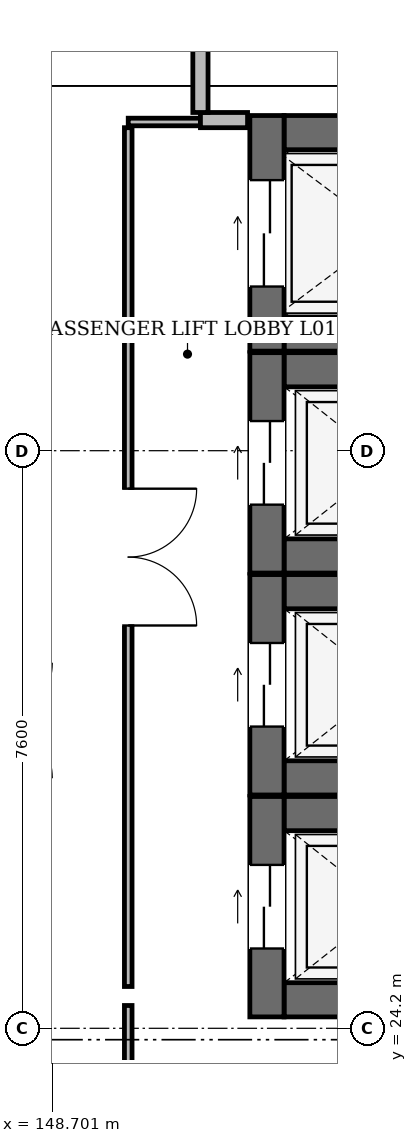
"""IFC4 building model, lengths in metres.
Left out: names, types, materials, properties, quantities, classifications, styles, units other than length and angle.
Written with IfcOpenShell. Run it as: python <this file> out.ifc"""

import sys

from ifc_helpers import new_model, si_unit, direction, frame, frame_2d, origin, place, context, subcontext, project, spatial, rectangle, extrude, element, fill, save


model = new_model("IFC4")
c1 = context("Model", 3, precision=1e-05, world=origin(), true_north=direction((0.0, 1.0)))
c2 = subcontext(c1, "Body", "Model", "MODEL_VIEW")
j1 = project(units=[si_unit("LENGTHUNIT", "METRE"), si_unit("PLANEANGLEUNIT", "RADIAN")], contexts=[c1])
p1 = place(None, origin())
s1 = spatial("IfcSite", under=j1, at=p1, CompositionType="ELEMENT")
p2 = place(p1, origin())
s2 = spatial("IfcBuilding", under=s1, at=p2, CompositionType="ELEMENT")
p3 = place(p2, frame((0.0, 0.0, 5.4)))
s3 = spatial("IfcBuildingStorey", under=s2, at=p3, CompositionType="ELEMENT", Elevation=5.4)
for number, where, z_axis, x_axis in (
    (1, (151.75, 24.575, 0.0), (0.0, 0.0, 1.0), (1.0, 0.0, 0.0)),
    (2, (151.75, 27.025, 0.0), (0.0, 0.0, 1.0), (1.0, 0.0, 0.0)),
):
    element("IfcWall", number, at=place(p3, frame(where, z_axis=z_axis, x_axis=x_axis)), inside=s3, PredefinedType="SHEAR", context=c2, shape_type="SweptSolid", body=[
        extrude(rectangle(XDim=2.7, YDim=0.45, at=frame_2d((1.35, 0.0))), origin(), (0.0, 0.0, 1.0), 4.52),
    ])
p4 = place(p3, frame((151.525, 24.35, 0.0), z_axis=(0.0, 0.0, 1.0), x_axis=(0.0, 1.0, 0.0)))
e3 = element("IfcWall", 3, at=p4, inside=s3, PredefinedType="SHEAR", context=c2, shape_type="SweptSolid", body=[
    extrude(rectangle(XDim=2.9, YDim=0.45, at=frame_2d((1.45, 0.0))), origin(), (0.0, 0.0, 1.0), 4.52),
])
p5 = place(p4, frame((0.9, 0.0, 0.0)))
e4 = element("IfcOpeningElement", 4, at=p5, cuts=e3, PredefinedType="OPENING", context=c2, shape_type="SweptSolid", body=[
    extrude(rectangle(XDim=1.1, YDim=2.2, at=frame_2d((0.55, 1.1))), frame((0.0, 0.237, 0.0), z_axis=(0.0, -1.0, 0.0), x_axis=(1.0, 0.0, 0.0)), (0.0, 0.0, 1.0), 0.474),
])
for number, where, z_axis, x_axis in (
    (5, (151.75, 27.495, 0.0), (0.0, 0.0, 1.0), (1.0, 0.0, 0.0)),
    (6, (151.75, 29.945, 0.0), (0.0, 0.0, 1.0), (1.0, 0.0, 0.0)),
):
    element("IfcWall", number, at=place(p3, frame(where, z_axis=z_axis, x_axis=x_axis)), inside=s3, PredefinedType="SHEAR", context=c2, shape_type="SweptSolid", body=[
        extrude(rectangle(XDim=2.7, YDim=0.45, at=frame_2d((1.35, 0.0))), origin(), (0.0, 0.0, 1.0), 4.52),
    ])
p6 = place(p3, frame((151.525, 27.27, 0.0), z_axis=(0.0, 0.0, 1.0), x_axis=(0.0, 1.0, 0.0)))
e7 = element("IfcWall", 7, at=p6, inside=s3, PredefinedType="SHEAR", context=c2, shape_type="SweptSolid", body=[
    extrude(rectangle(XDim=2.9, YDim=0.45, at=frame_2d((1.45, 0.0))), origin(), (0.0, 0.0, 1.0), 4.52),
])
p7 = place(p6, frame((0.9, 0.0, 0.0)))
e8 = element("IfcOpeningElement", 8, at=p7, cuts=e7, PredefinedType="OPENING", context=c2, shape_type="SweptSolid", body=[
    extrude(rectangle(XDim=1.1, YDim=2.2, at=frame_2d((0.55, 1.1))), frame((0.0, 0.237, 0.0), z_axis=(0.0, -1.0, 0.0), x_axis=(1.0, 0.0, 0.0)), (0.0, 0.0, 1.0), 0.474),
])
for number, where, z_axis, x_axis in (
    (9, (151.75, 30.415, 0.0), (0.0, 0.0, 1.0), (1.0, 0.0, 0.0)),
    (10, (151.75, 32.865, 0.0), (0.0, 0.0, 1.0), (1.0, 0.0, 0.0)),
):
    element("IfcWall", number, at=place(p3, frame(where, z_axis=z_axis, x_axis=x_axis)), inside=s3, PredefinedType="SHEAR", context=c2, shape_type="SweptSolid", body=[
        extrude(rectangle(XDim=2.7, YDim=0.45, at=frame_2d((1.35, 0.0))), origin(), (0.0, 0.0, 1.0), 4.52),
    ])
p8 = place(p3, frame((151.525, 30.19, 0.0), z_axis=(0.0, 0.0, 1.0), x_axis=(0.0, 1.0, 0.0)))
e11 = element("IfcWall", 11, at=p8, inside=s3, PredefinedType="SHEAR", context=c2, shape_type="SweptSolid", body=[
    extrude(rectangle(XDim=2.9, YDim=0.45, at=frame_2d((1.45, 0.0))), origin(), (0.0, 0.0, 1.0), 4.52),
])
p9 = place(p8, frame((0.9, 0.0, 0.0)))
e12 = element("IfcOpeningElement", 12, at=p9, cuts=e11, PredefinedType="OPENING", context=c2, shape_type="SweptSolid", body=[
    extrude(rectangle(XDim=1.1, YDim=2.2, at=frame_2d((0.55, 1.1))), frame((0.0, 0.237, 0.0), z_axis=(0.0, -1.0, 0.0), x_axis=(1.0, 0.0, 0.0)), (0.0, 0.0, 1.0), 0.474),
])
for number, where, z_axis, x_axis in (
    (13, (151.75, 33.335, 0.0), (0.0, 0.0, 1.0), (1.0, 0.0, 0.0)),
    (14, (151.75, 35.985, 0.0), (0.0, 0.0, 1.0), (1.0, 0.0, 0.0)),
):
    element("IfcWall", number, at=place(p3, frame(where, z_axis=z_axis, x_axis=x_axis)), inside=s3, PredefinedType="SHEAR", context=c2, shape_type="SweptSolid", body=[
        extrude(rectangle(XDim=2.7, YDim=0.45, at=frame_2d((1.35, 0.0))), origin(), (0.0, 0.0, 1.0), 4.52),
    ])
p10 = place(p3, frame((151.525, 33.11, 0.0), z_axis=(0.0, 0.0, 1.0), x_axis=(0.0, 1.0, 0.0)))
e15 = element("IfcWall", 15, at=p10, inside=s3, PredefinedType="SHEAR", context=c2, shape_type="SweptSolid", body=[
    extrude(rectangle(XDim=3.1, YDim=0.45, at=frame_2d((1.55, 0.0))), origin(), (0.0, 0.0, 1.0), 4.52),
])
p11 = place(p10, frame((0.85, 0.0, 0.0)))
e16 = element("IfcOpeningElement", 16, at=p11, cuts=e15, PredefinedType="OPENING", context=c2, shape_type="SweptSolid", body=[
    extrude(rectangle(XDim=1.4, YDim=2.3, at=frame_2d((0.7, 1.15))), frame((0.0, 0.237, 0.0), z_axis=(0.0, -1.0, 0.0), x_axis=(1.0, 0.0, 0.0)), (0.0, 0.0, 1.0), 0.474),
])
p12 = place(p3, frame((149.7, 24.75, 0.0), z_axis=(0.0, 0.0, 1.0), x_axis=(0.0, 1.0, 0.0)))
e17 = element("IfcWall", 17, at=p12, inside=s3, PredefinedType="PARTITIONING", context=c2, shape_type="SweptSolid", body=[
    extrude(rectangle(XDim=11.3, YDim=0.1, at=frame_2d((5.65, 0.0))), origin(), (0.0, 0.0, 1.0), 4.405),
])
p13 = place(p12, frame((4.75, 0.0, 0.0)))
e18 = element("IfcOpeningElement", 18, at=p13, cuts=e17, PredefinedType="OPENING", context=c2, shape_type="SweptSolid", body=[
    extrude(rectangle(XDim=1.8, YDim=2.4, at=frame_2d((0.9, 1.2))), frame((0.0, 0.062, 0.0), z_axis=(0.0, -1.0, 0.0), x_axis=(1.0, 0.0, 0.0)), (0.0, 0.0, 1.0), 0.124),
])
p14 = place(p3, frame((149.7, 36.125, 0.0), z_axis=(0.0, 0.0, 1.0), x_axis=(1.0, 0.0, 0.0)))
e19 = element("IfcWall", 19, at=p14, inside=s3, PredefinedType="PARTITIONING", context=c2, shape_type="SweptSolid", body=[
    extrude(rectangle(XDim=0.95, YDim=0.1, at=frame_2d((0.475, 0.0))), origin(), (0.0, 0.0, 1.0), 4.405),
])
p15 = place(p3, frame((150.65, 36.15, 0.0), z_axis=(0.0, 0.0, 1.0), x_axis=(1.0, 0.0, 0.0)))
e20 = element("IfcWall", 20, at=p15, inside=s3, PredefinedType="PARTITIONING", context=c2, shape_type="SweptSolid", body=[
    extrude(rectangle(XDim=0.62, YDim=0.2, at=frame_2d((0.31, 0.0))), origin(), (0.0, 0.0, 1.0), 4.405),
])
p16 = place(p3, frame((149.7, 24.5, 0.0), z_axis=(0.0, 0.0, 1.0), x_axis=(0.0, -1.0, 0.0)))
e21 = element("IfcWall", 21, at=p16, inside=s3, PredefinedType="PARTITIONING", context=c2, shape_type="SweptSolid", body=[
    extrude(rectangle(XDim=0.8, YDim=0.1, at=frame_2d((0.4, 0.0))), origin(), (0.0, 0.0, 1.0), 4.405),
])
p17 = place(p3, frame((150.65, 47.6, 0.0), z_axis=(0.0, 0.0, 1.0), x_axis=(0.0, -1.0, 0.0)))
e22 = element("IfcWall", 22, at=p17, inside=s3, PredefinedType="PARTITIONING", context=c2, shape_type="SweptSolid", body=[
    extrude(rectangle(XDim=11.35, YDim=0.2, at=frame_2d((5.675, 0.0))), origin(), (0.0, 0.0, 1.0), 4.405),
])
p18 = place(p5, origin())
e23 = element("IfcDoor", 23, at=p18, inside=s3, OperationType="DOUBLE_DOOR_SLIDING", PredefinedType="DOOR", context=c2, shape_type="SweptSolid", body=[
    extrude(rectangle(XDim=1.1, YDim=2.2, at=frame_2d((0.55, 1.1))), frame((0.0, 0.025, 0.0), z_axis=(0.0, -1.0, 0.0), x_axis=(1.0, 0.0, 0.0)), (0.0, 0.0, 1.0), 0.05),
])
fill(e4, e23)
p19 = place(p7, origin())
e24 = element("IfcDoor", 24, at=p19, inside=s3, OperationType="DOUBLE_DOOR_SLIDING", PredefinedType="DOOR", context=c2, shape_type="SweptSolid", body=[
    extrude(rectangle(XDim=1.1, YDim=2.2, at=frame_2d((0.55, 1.1))), frame((0.0, 0.025, 0.0), z_axis=(0.0, -1.0, 0.0), x_axis=(1.0, 0.0, 0.0)), (0.0, 0.0, 1.0), 0.05),
])
fill(e8, e24)
p20 = place(p9, origin())
e25 = element("IfcDoor", 25, at=p20, inside=s3, OperationType="DOUBLE_DOOR_SLIDING", PredefinedType="DOOR", context=c2, shape_type="SweptSolid", body=[
    extrude(rectangle(XDim=1.1, YDim=2.2, at=frame_2d((0.55, 1.1))), frame((0.0, 0.025, 0.0), z_axis=(0.0, -1.0, 0.0), x_axis=(1.0, 0.0, 0.0)), (0.0, 0.0, 1.0), 0.05),
])
fill(e12, e25)
p21 = place(p11, origin())
e26 = element("IfcDoor", 26, at=p21, inside=s3, OperationType="DOUBLE_DOOR_SLIDING", PredefinedType="DOOR", context=c2, shape_type="SweptSolid", body=[
    extrude(rectangle(XDim=1.4, YDim=2.3, at=frame_2d((0.7, 1.15))), frame((0.0, 0.025, 0.0), z_axis=(0.0, -1.0, 0.0), x_axis=(1.0, 0.0, 0.0)), (0.0, 0.0, 1.0), 0.05),
])
fill(e16, e26)
p22 = place(p13, frame((1.8, 0.0, 0.0), z_axis=(0.0, 0.0, 1.0), x_axis=(-1.0, 0.0, 0.0)))
e27 = element("IfcDoor", 27, at=p22, inside=s3, OperationType="DOUBLE_DOOR_SINGLE_SWING", PredefinedType="DOOR", context=c2, shape_type="SweptSolid", body=[
    extrude(rectangle(XDim=1.8, YDim=2.4, at=frame_2d((0.9, 1.2))), frame((0.0, 0.025, 0.0), z_axis=(0.0, -1.0, 0.0), x_axis=(1.0, 0.0, 0.0)), (0.0, 0.0, 1.0), 0.05),
])
fill(e18, e27)
save(model, sys.argv[1])
